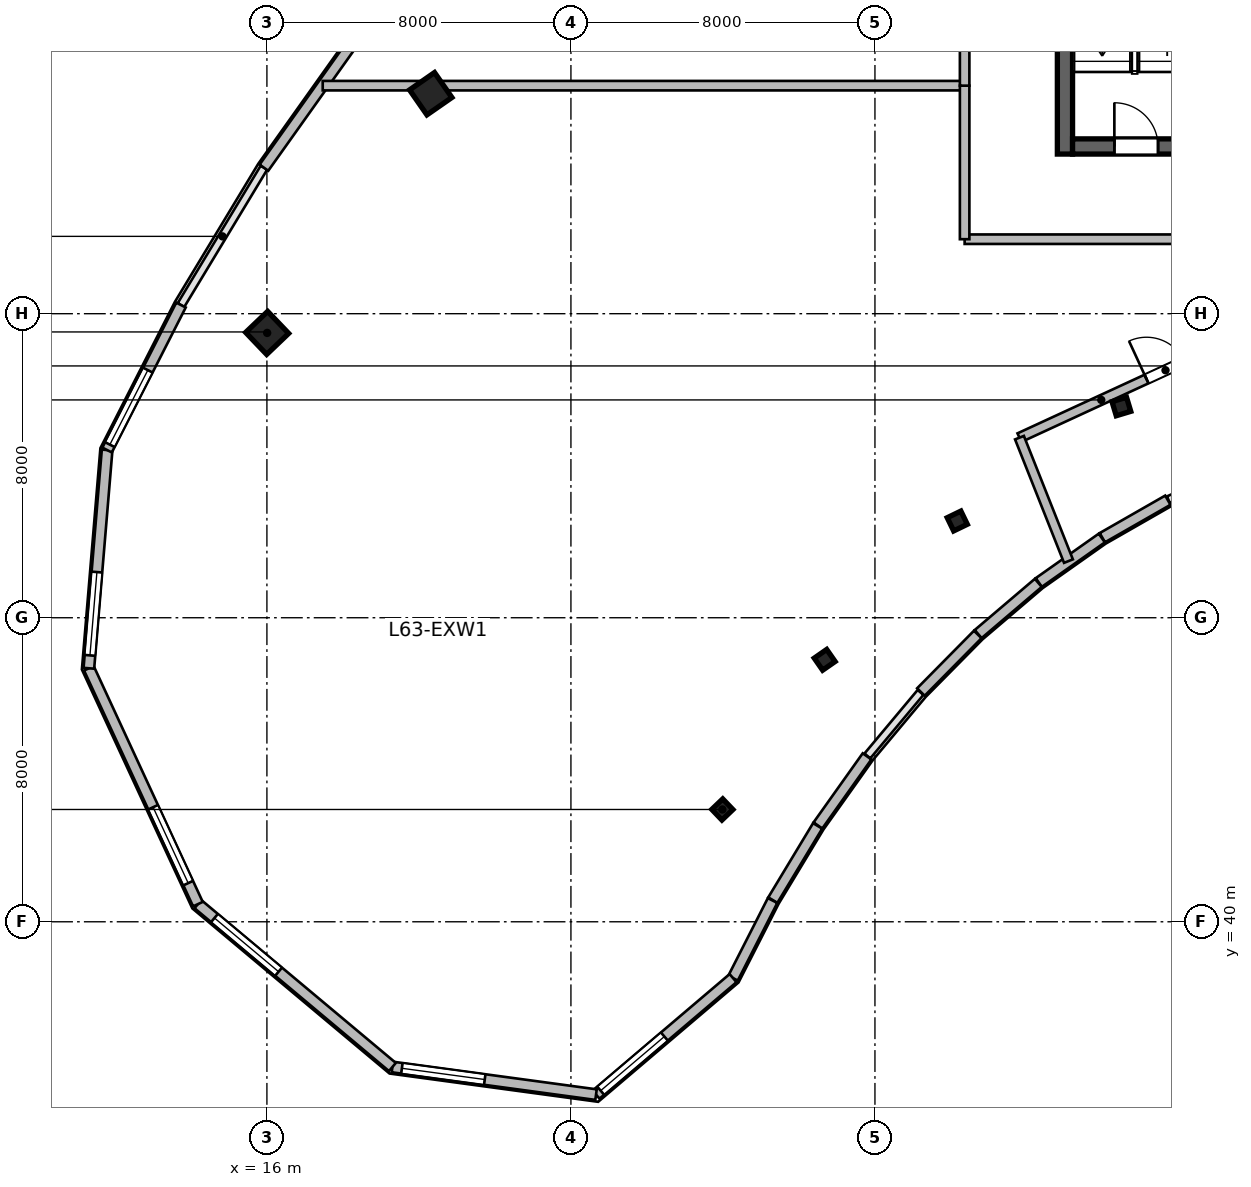
"""IFC4 building model, lengths in metres.
Left out: names, types, materials, properties, quantities, classifications, styles, units other than length and angle.
Written with IfcOpenShell. Run it as: python <this file> out.ifc"""

import sys

from ifc_helpers import new_model, si_unit, direction, frame, frame_2d, origin, origin_2d, place, context, subcontext, project, spatial, rectangle, i_section, extrude, source, transform, mapped, element, fill, save


model = new_model("IFC4")
c1 = context("Model", 3, precision=1e-05, world=origin(), true_north=direction((0.0, 1.0)))
c2 = subcontext(c1, "Body", "Model", "MODEL_VIEW")
j1 = project(units=[si_unit("LENGTHUNIT", "METRE"), si_unit("PLANEANGLEUNIT", "RADIAN")], contexts=[c1])
p1 = place(None, origin())
s1 = spatial("IfcSite", under=j1, at=p1, CompositionType="ELEMENT")
p2 = place(p1, origin())
s2 = spatial("IfcBuilding", under=s1, at=p2, CompositionType="ELEMENT")
p3 = place(p2, frame((0.0, 0.0, 260.1)))
s3 = spatial("IfcBuildingStorey", under=s2, at=p3, CompositionType="ELEMENT", Elevation=260.1)
m1 = source(origin(), c2, "Body", "SweptSolid", [
    extrude(rectangle(XDim=12.0, YDim=0.4, at=frame_2d((6.0, 0.0))), origin(), (0.0, 0.0, 1.0), 3.9),
])
p4 = place(p3, frame((37.0, 60.2, 0.0), z_axis=(0.0, 0.0, 1.0), x_axis=(0.0, 1.0, 0.0)))
e1 = element("IfcWall", 1, at=p4, inside=s3, PredefinedType="SHEAR", context=c2, shape_type="MappedRepresentation", body=[
    mapped(m1, transform((0.0, 0.0, 0.0), scale=1.0)),
])
m2 = source(origin(), c2, "Body", "SweptSolid", [
    extrude(rectangle(XDim=21.6, YDim=0.4, at=frame_2d((10.8, 0.0))), origin(), (0.0, 0.0, 1.0), 3.9),
])
p5 = place(p3, frame((37.2, 60.4, 0.0), z_axis=(0.0, 0.0, 1.0), x_axis=(1.0, 0.0, 0.0)))
e2 = element("IfcWall", 2, at=p5, inside=s3, PredefinedType="SHEAR", context=c2, shape_type="MappedRepresentation", body=[
    mapped(m2, transform((0.0, 0.0, 0.0), scale=1.0)),
])
p6 = place(p5, frame((1.1, 0.0, 0.0)))
e3 = element("IfcOpeningElement", 3, at=p6, cuts=e2, PredefinedType="OPENING", context=c2, shape_type="SweptSolid", body=[
    extrude(rectangle(XDim=1.15, YDim=2.15, at=frame_2d((0.575, 1.075))), frame((0.0, 0.21, 0.0), z_axis=(0.0, -1.0, 0.0), x_axis=(1.0, 0.0, 0.0)), (0.0, 0.0, 1.0), 0.42),
])
p7 = place(p5, frame((19.5, 0.0, 0.0)))
e4 = element("IfcOpeningElement", 4, at=p7, cuts=e2, PredefinedType="OPENING", context=c2, shape_type="SweptSolid", body=[
    extrude(rectangle(XDim=0.9, YDim=2.1, at=frame_2d((0.45, 1.05))), frame((0.0, 0.21, 0.0), z_axis=(0.0, -1.0, 0.0), x_axis=(1.0, 0.0, 0.0)), (0.0, 0.0, 1.0), 0.42),
])
p8 = place(p5, frame((12.02, 0.0, 0.0)))
e5 = element("IfcOpeningElement", 5, at=p8, cuts=e2, PredefinedType="OPENING", context=c2, shape_type="SweptSolid", body=[
    extrude(rectangle(XDim=1.6, YDim=2.15, at=frame_2d((0.8, 1.075))), frame((0.0, 0.21, 0.0), z_axis=(0.0, -1.0, 0.0), x_axis=(1.0, 0.0, 0.0)), (0.0, 0.0, 1.0), 0.42),
])
m3 = source(origin(), c2, "Body", "SweptSolid", [
    extrude(i_section(OverallWidth=0.399, OverallDepth=0.387, WebThickness=0.021, FlangeThickness=0.033, at=origin_2d()), origin(), (0.0, 0.0, 1.0), 3.9),
])
p9 = place(p3, frame((27.985, 42.955, 0.0), z_axis=(0.0, 0.0, 1.0), x_axis=(-0.690756218984, 0.723087716626, 0.0)))
e6 = element("IfcColumn", 6, at=p9, inside=s3, PredefinedType="COLUMN", context=c2, shape_type="MappedRepresentation", body=[
    mapped(m3, transform((0.0, 0.0, 0.0), scale=1.0)),
])
m4 = source(origin(), c2, "Body", "SweptSolid", [
    extrude(rectangle(XDim=0.8, YDim=0.8, at=origin_2d()), origin(), (0.0, 0.0, 1.0), 3.9),
])
p10 = place(p3, frame((16.007, 55.494, 0.0), z_axis=(0.0, 0.0, 1.0), x_axis=(-0.690756218984, 0.723087716626, 0.0)))
e7 = element("IfcColumn", 7, at=p10, inside=s3, PredefinedType="COLUMN", context=c2, shape_type="MappedRepresentation", body=[
    mapped(m4, transform((0.0, 0.0, 0.0), scale=1.0)),
])
p11 = place(p3, frame((30.677, 46.892, 0.0), z_axis=(0.0, 0.0, 1.0), x_axis=(-0.571143442153, 0.820850271661, 0.0)))
e8 = element("IfcColumn", 8, at=p11, inside=s3, PredefinedType="COLUMN", context=c2, shape_type="MappedRepresentation", body=[
    mapped(m3, transform((0.0, 0.0, 0.0), scale=1.0)),
])
p12 = place(p3, frame((20.311, 61.789, 0.0), z_axis=(0.0, 0.0, 1.0), x_axis=(-0.571143442153, 0.820850271661, 0.0)))
e9 = element("IfcColumn", 9, at=p12, inside=s3, PredefinedType="COLUMN", context=c2, shape_type="MappedRepresentation", body=[
    mapped(m4, transform((0.0, 0.0, 0.0), scale=1.0)),
])
for number, where, z_axis, x_axis in (
    (10, (34.166, 50.545, 0.0), (0.0, 0.0, 1.0), (-0.436, 0.9, 0.0)),
    (11, (38.485, 53.558, 0.0), (0.0, 0.0, 1.0), (-0.289, 0.957, 0.0)),
):
    element("IfcColumn", number, at=place(p3, frame(where, z_axis=z_axis, x_axis=x_axis)), inside=s3, PredefinedType="COLUMN", context=c2, shape_type="MappedRepresentation", body=[
        mapped(m3, transform((0.0, 0.0, 0.0), scale=1.0)),
    ])
m5 = source(origin(), c2, "Body", "SweptSolid", [
    extrude(rectangle(XDim=1.986, YDim=0.28, at=frame_2d((0.993, 0.0))), origin(), (0.0, 0.0, 1.0), 3.65),
])
p13 = place(p3, frame((39.708, 51.093, 0.0), z_axis=(0.0, 0.0, 1.0), x_axis=(-0.867940364671, -0.496668423976, 0.0)))
e12 = element("IfcWall", 12, at=p13, inside=s3, PredefinedType="SOLIDWALL", context=c2, shape_type="MappedRepresentation", body=[
    mapped(m5, transform((0.0, 0.0, 0.0), scale=1.0)),
])
m6 = source(origin(), c2, "Body", "SweptSolid", [
    extrude(rectangle(XDim=2.03, YDim=0.28, at=frame_2d((1.015, 0.0))), origin(), (0.0, 0.0, 1.0), 3.65),
])
p14 = place(p3, frame((37.969, 50.097, 0.0), z_axis=(0.0, 0.0, 1.0), x_axis=(-0.816987864272, -0.576654861796, 0.0)))
e13 = element("IfcWall", 13, at=p14, inside=s3, PredefinedType="SOLIDWALL", context=c2, shape_type="MappedRepresentation", body=[
    mapped(m6, transform((0.0, 0.0, 0.0), scale=1.0)),
])
m7 = source(origin(), c2, "Body", "SweptSolid", [
    extrude(rectangle(XDim=2.078, YDim=0.28, at=frame_2d((1.039, 0.0))), origin(), (0.0, 0.0, 1.0), 3.65),
])
p15 = place(p3, frame((36.298, 48.917, 0.0), z_axis=(0.0, 0.0, 1.0), x_axis=(-0.761475215802, -0.648194026291, 0.0)))
e14 = element("IfcWall", 14, at=p15, inside=s3, PredefinedType="SOLIDWALL", context=c2, shape_type="MappedRepresentation", body=[
    mapped(m7, transform((0.0, 0.0, 0.0), scale=1.0)),
])
m8 = source(origin(), c2, "Body", "SweptSolid", [
    extrude(rectangle(XDim=2.128, YDim=0.28, at=frame_2d((1.064, 0.0))), origin(), (0.0, 0.0, 1.0), 3.65),
])
p16 = place(p3, frame((34.705, 47.56, 0.0), z_axis=(0.0, 0.0, 1.0), x_axis=(-0.702676164983, -0.7115098082, 0.0)))
e15 = element("IfcWall", 15, at=p16, inside=s3, PredefinedType="SOLIDWALL", context=c2, shape_type="MappedRepresentation", body=[
    mapped(m8, transform((0.0, 0.0, 0.0), scale=1.0)),
])
m9 = source(origin(), c2, "Body", "SweptSolid", [
    extrude(rectangle(XDim=2.231, YDim=0.28, at=frame_2d((1.116, 0.0))), origin(), (0.0, 0.0, 1.0), 3.65),
])
p17 = place(p3, frame((31.792, 44.352, 0.0), z_axis=(0.0, 0.0, 1.0), x_axis=(-0.579622296598, -0.814885263879, 0.0)))
e16 = element("IfcWall", 16, at=p17, inside=s3, PredefinedType="SOLIDWALL", context=c2, shape_type="MappedRepresentation", body=[
    mapped(m9, transform((0.0, 0.0, 0.0), scale=1.0)),
])
m10 = source(origin(), c2, "Body", "SweptSolid", [
    extrude(rectangle(XDim=2.281, YDim=0.28, at=frame_2d((1.14, 0.0))), origin(), (0.0, 0.0, 1.0), 3.65),
])
p18 = place(p3, frame((30.492, 42.523, 0.0), z_axis=(0.0, 0.0, 1.0), x_axis=(-0.516917942662, -0.856034952881, 0.0)))
e17 = element("IfcWall", 17, at=p18, inside=s3, PredefinedType="SOLIDWALL", context=c2, shape_type="MappedRepresentation", body=[
    mapped(m10, transform((0.0, 0.0, 0.0), scale=1.0)),
])
m11 = source(origin(), c2, "Body", "SweptSolid", [
    extrude(rectangle(XDim=2.292, YDim=0.28, at=frame_2d((1.146, 0.0))), origin(), (0.0, 0.0, 1.0), 3.65),
])
p19 = place(p3, frame((29.306, 40.559, 0.0), z_axis=(0.0, 0.0, 1.0), x_axis=(-0.453933760778, -0.891035431858, 0.0)))
e18 = element("IfcWall", 18, at=p19, inside=s3, PredefinedType="SOLIDWALL", context=c2, shape_type="MappedRepresentation", body=[
    mapped(m11, transform((0.0, 0.0, 0.0), scale=1.0)),
])
m12 = source(origin(), c2, "Body", "SweptSolid", [
    extrude(rectangle(XDim=4.732, YDim=0.28, at=frame_2d((2.366, 0.0))), origin(), (0.0, 0.0, 1.0), 3.65),
])
p20 = place(p3, frame((28.266, 38.517, 0.0), z_axis=(0.0, 0.0, 1.0), x_axis=(-0.761912583238, -0.647679871158, 0.0)))
e19 = element("IfcWall", 19, at=p20, inside=s3, PredefinedType="SOLIDWALL", context=c2, shape_type="MappedRepresentation", body=[
    mapped(m12, transform((0.0, 0.0, 0.0), scale=1.0)),
])
p21 = place(p20, frame((2.372, 0.0, 0.95)))
e20 = element("IfcOpeningElement", 20, at=p21, cuts=e19, PredefinedType="OPENING", context=c2, shape_type="SweptSolid", body=[
    extrude(rectangle(XDim=2.2, YDim=2.1, at=frame_2d((1.1, 1.05))), frame((0.0, 0.15, 0.0), z_axis=(0.0, -1.0, 0.0), x_axis=(1.0, 0.0, 0.0)), (0.0, 0.0, 1.0), 0.3),
])
m13 = source(origin(), c2, "Body", "SweptSolid", [
    extrude(rectangle(XDim=5.408, YDim=0.28, at=frame_2d((2.704, 0.0))), origin(), (0.0, 0.0, 1.0), 3.65),
])
p22 = place(p3, frame((24.661, 35.452, 0.0), z_axis=(0.0, 0.0, 1.0), x_axis=(-0.990932903229, 0.134357661853, 0.0)))
e21 = element("IfcWall", 21, at=p22, inside=s3, PredefinedType="SOLIDWALL", context=c2, shape_type="MappedRepresentation", body=[
    mapped(m13, transform((0.0, 0.0, 0.0), scale=1.0)),
])
p23 = place(p22, frame((2.956, 0.0, 0.95)))
e22 = element("IfcOpeningElement", 22, at=p23, cuts=e21, PredefinedType="OPENING", context=c2, shape_type="SweptSolid", body=[
    extrude(rectangle(XDim=2.2, YDim=2.1, at=frame_2d((1.1, 1.05))), frame((0.0, 0.15, 0.0), z_axis=(0.0, -1.0, 0.0), x_axis=(1.0, 0.0, 0.0)), (0.0, 0.0, 1.0), 0.3),
])
m14 = source(origin(), c2, "Body", "SweptSolid", [
    extrude(rectangle(XDim=6.675, YDim=0.28, at=frame_2d((3.338, 0.0))), origin(), (0.0, 0.0, 1.0), 3.65),
])
p24 = place(p3, frame((19.302, 36.179, 0.0), z_axis=(0.0, 0.0, 1.0), x_axis=(-0.766726273546, 0.641974159491, 0.0)))
e23 = element("IfcWall", 23, at=p24, inside=s3, PredefinedType="SOLIDWALL", context=c2, shape_type="MappedRepresentation", body=[
    mapped(m14, transform((0.0, 0.0, 0.0), scale=1.0)),
])
p25 = place(p24, frame((3.906, 0.0, 0.95)))
e24 = element("IfcOpeningElement", 24, at=p25, cuts=e23, PredefinedType="OPENING", context=c2, shape_type="SweptSolid", body=[
    extrude(rectangle(XDim=2.2, YDim=2.1, at=frame_2d((1.1, 1.05))), frame((0.0, 0.15, 0.0), z_axis=(0.0, -1.0, 0.0), x_axis=(1.0, 0.0, 0.0)), (0.0, 0.0, 1.0), 0.3),
])
m15 = source(origin(), c2, "Body", "SweptSolid", [
    extrude(rectangle(XDim=6.837, YDim=0.28, at=frame_2d((3.418, 0.0))), origin(), (0.0, 0.0, 1.0), 3.65),
])
p26 = place(p3, frame((14.184, 40.464, 0.0), z_axis=(0.0, 0.0, 1.0), x_axis=(-0.419621957862, 0.907698965781, 0.0)))
e25 = element("IfcWall", 25, at=p26, inside=s3, PredefinedType="SOLIDWALL", context=c2, shape_type="MappedRepresentation", body=[
    mapped(m15, transform((0.0, 0.0, 0.0), scale=1.0)),
])
p27 = place(p26, frame((0.609, 0.0, 0.95)))
e26 = element("IfcOpeningElement", 26, at=p27, cuts=e25, PredefinedType="OPENING", context=c2, shape_type="SweptSolid", body=[
    extrude(rectangle(XDim=2.2, YDim=2.1, at=frame_2d((1.1, 1.05))), frame((0.0, 0.15, 0.0), z_axis=(0.0, -1.0, 0.0), x_axis=(1.0, 0.0, 0.0)), (0.0, 0.0, 1.0), 0.3),
])
m16 = source(origin(), c2, "Body", "SweptSolid", [
    extrude(rectangle(XDim=5.763, YDim=0.28, at=frame_2d((2.881, 0.0))), origin(), (0.0, 0.0, 1.0), 3.65),
])
p28 = place(p3, frame((11.315, 46.67, 0.0), z_axis=(0.0, 0.0, 1.0), x_axis=(0.083290906041, 0.996525275631, 0.0)))
e27 = element("IfcWall", 27, at=p28, inside=s3, PredefinedType="SOLIDWALL", context=c2, shape_type="MappedRepresentation", body=[
    mapped(m16, transform((0.0, 0.0, 0.0), scale=1.0)),
])
p29 = place(p28, frame((0.341, 0.0, 0.95)))
e28 = element("IfcOpeningElement", 28, at=p29, cuts=e27, PredefinedType="OPENING", context=c2, shape_type="SweptSolid", body=[
    extrude(rectangle(XDim=2.2, YDim=2.1, at=frame_2d((1.1, 1.05))), frame((0.0, 0.15, 0.0), z_axis=(0.0, -1.0, 0.0), x_axis=(1.0, 0.0, 0.0)), (0.0, 0.0, 1.0), 0.3),
])
m17 = source(origin(), c2, "Body", "SweptSolid", [
    extrude(rectangle(XDim=4.281, YDim=0.28, at=frame_2d((2.141, 0.0))), origin(), (0.0, 0.0, 1.0), 3.65),
])
p30 = place(p3, frame((11.795, 52.413, 0.0), z_axis=(0.0, 0.0, 1.0), x_axis=(0.454020597637, 0.890991187903, 0.0)))
e29 = element("IfcWall", 29, at=p30, inside=s3, PredefinedType="SOLIDWALL", context=c2, shape_type="MappedRepresentation", body=[
    mapped(m17, transform((0.0, 0.0, 0.0), scale=1.0)),
])
p31 = place(p30, frame((0.16, 0.0, 0.95)))
e30 = element("IfcOpeningElement", 30, at=p31, cuts=e29, PredefinedType="OPENING", context=c2, shape_type="SweptSolid", body=[
    extrude(rectangle(XDim=2.2, YDim=2.1, at=frame_2d((1.1, 1.05))), frame((0.0, 0.15, 0.0), z_axis=(0.0, -1.0, 0.0), x_axis=(1.0, 0.0, 0.0)), (0.0, 0.0, 1.0), 0.3),
])
m18 = source(origin(), c2, "Body", "SweptSolid", [
    extrude(rectangle(XDim=4.129, YDim=0.28, at=frame_2d((2.065, 0.0))), origin(), (0.0, 0.0, 1.0), 3.65),
])
p32 = place(p3, frame((15.921, 59.842, 0.0), z_axis=(0.0, 0.0, 1.0), x_axis=(0.57959272029, 0.814906300495, 0.0)))
e31 = element("IfcWall", 31, at=p32, inside=s3, PredefinedType="SOLIDWALL", context=c2, shape_type="MappedRepresentation", body=[
    mapped(m18, transform((0.0, 0.0, 0.0), scale=1.0)),
])
m19 = source(origin(), c2, "Body", "SweptSolid", [
    extrude(rectangle(XDim=8.464, YDim=0.25, at=frame_2d((4.232, 0.0))), origin(), (0.0, 0.0, 1.0), 3.65),
])
p33 = place(p3, frame((35.803, 52.738, 0.0), z_axis=(0.0, 0.0, 1.0), x_axis=(0.90801678306, 0.418933791524, 0.0)))
e32 = element("IfcWall", 32, at=p33, inside=s3, PredefinedType="PARTITIONING", context=c2, shape_type="MappedRepresentation", body=[
    mapped(m19, transform((0.0, 0.0, 0.0), scale=1.0)),
])
p34 = place(p33, frame((3.682, 0.0, 0.0)))
e33 = element("IfcOpeningElement", 33, at=p34, cuts=e32, PredefinedType="OPENING", context=c2, shape_type="SweptSolid", body=[
    extrude(rectangle(XDim=1.1, YDim=2.15, at=frame_2d((0.55, 1.075))), frame((0.0, 0.135, 0.0), z_axis=(0.0, -1.0, 0.0), x_axis=(1.0, 0.0, 0.0)), (0.0, 0.0, 1.0), 0.27),
])
m20 = source(origin(), c2, "Body", "SweptSolid", [
    extrude(rectangle(XDim=3.495, YDim=0.25, at=frame_2d((1.747, 0.0))), origin(), (0.0, 0.0, 1.0), 3.65),
])
p35 = place(p3, frame((37.092, 49.49, 0.0), z_axis=(0.0, 0.0, 1.0), x_axis=(-0.368859890644, 0.929485008526, 0.0)))
e34 = element("IfcWall", 34, at=p35, inside=s3, PredefinedType="PARTITIONING", context=c2, shape_type="MappedRepresentation", body=[
    mapped(m20, transform((0.0, 0.0, 0.0), scale=1.0)),
])
m21 = source(origin(), c2, "Body", "SweptSolid", [
    extrude(rectangle(XDim=12.39, YDim=0.25, at=frame_2d((6.195, 0.0))), origin(), (0.0, 0.0, 1.0), 3.65),
])
p36 = place(p3, frame((34.36, 57.96, 0.0), z_axis=(0.0, 0.0, 1.0), x_axis=(1.0, 0.0, 0.0)))
e35 = element("IfcWall", 35, at=p36, inside=s3, PredefinedType="PARTITIONING", context=c2, shape_type="MappedRepresentation", body=[
    mapped(m21, transform((0.0, 0.0, 0.0), scale=1.0)),
])
m22 = source(origin(), c2, "Body", "SweptSolid", [
    extrude(rectangle(XDim=16.892, YDim=0.25, at=frame_2d((8.446, 0.0))), origin(), (0.0, 0.0, 1.0), 3.65),
])
p37 = place(p3, frame((17.469, 62.0, 0.0), z_axis=(0.0, 0.0, 1.0), x_axis=(1.0, 0.0, 0.0)))
e36 = element("IfcWall", 36, at=p37, inside=s3, PredefinedType="PARTITIONING", context=c2, shape_type="MappedRepresentation", body=[
    mapped(m22, transform((0.0, 0.0, 0.0), scale=1.0)),
])
m23 = source(origin(), c2, "Body", "SweptSolid", [
    extrude(rectangle(XDim=4.04, YDim=0.25, at=frame_2d((2.02, 0.0))), origin(), (0.0, 0.0, 1.0), 3.65),
])
p38 = place(p3, frame((34.36, 57.96, 0.0), z_axis=(0.0, 0.0, 1.0), x_axis=(0.0, 1.0, 0.0)))
e37 = element("IfcWall", 37, at=p38, inside=s3, PredefinedType="PARTITIONING", context=c2, shape_type="MappedRepresentation", body=[
    mapped(m23, transform((0.0, 0.0, 0.0), scale=1.0)),
])
m24 = source(origin(), c2, "Body", "SweptSolid", [
    extrude(rectangle(XDim=14.245, YDim=0.25, at=frame_2d((7.123, 0.0))), origin(), (0.0, 0.0, 1.0), 3.65),
])
p39 = place(p3, frame((34.36, 62.0, 0.0), z_axis=(0.0, 0.0, 1.0), x_axis=(0.0, 1.0, 0.0)))
e38 = element("IfcWall", 38, at=p39, inside=s3, PredefinedType="PARTITIONING", context=c2, shape_type="MappedRepresentation", body=[
    mapped(m24, transform((0.0, 0.0, 0.0), scale=1.0)),
])
p40 = place(p39, frame((6.573, 0.0, 0.0)))
e39 = element("IfcOpeningElement", 39, at=p40, cuts=e38, PredefinedType="OPENING", context=c2, shape_type="SweptSolid", body=[
    extrude(rectangle(XDim=1.1, YDim=2.15, at=frame_2d((0.55, 1.075))), frame((0.0, 0.135, 0.0), z_axis=(0.0, -1.0, 0.0), x_axis=(1.0, 0.0, 0.0)), (0.0, 0.0, 1.0), 0.27),
])
m25 = source(origin(), c2, "Body", "SweptSolid", [
    extrude(rectangle(XDim=2.2, YDim=2.1, at=frame_2d((1.1, 1.05))), frame((0.0, 0.03, 0.0), z_axis=(0.0, -1.0, 0.0), x_axis=(1.0, 0.0, 0.0)), (0.0, 0.0, 1.0), 0.06),
])
p41 = place(p21, origin())
e40 = element("IfcWindow", 40, at=p41, inside=s3, PartitioningType="TRIPLE_PANEL_VERTICAL", PredefinedType="WINDOW", context=c2, shape_type="MappedRepresentation", body=[
    mapped(m25, transform((0.0, 0.0, 0.0), scale=1.0)),
])
fill(e20, e40)
p42 = place(p23, origin())
e41 = element("IfcWindow", 41, at=p42, inside=s3, PartitioningType="TRIPLE_PANEL_VERTICAL", PredefinedType="WINDOW", context=c2, shape_type="MappedRepresentation", body=[
    mapped(m25, transform((0.0, 0.0, 0.0), scale=1.0)),
])
fill(e22, e41)
p43 = place(p25, origin())
e42 = element("IfcWindow", 42, at=p43, inside=s3, PartitioningType="TRIPLE_PANEL_VERTICAL", PredefinedType="WINDOW", context=c2, shape_type="MappedRepresentation", body=[
    mapped(m25, transform((0.0, 0.0, 0.0), scale=1.0)),
])
fill(e24, e42)
p44 = place(p27, origin())
e43 = element("IfcWindow", 43, at=p44, inside=s3, PartitioningType="TRIPLE_PANEL_VERTICAL", PredefinedType="WINDOW", context=c2, shape_type="MappedRepresentation", body=[
    mapped(m25, transform((0.0, 0.0, 0.0), scale=1.0)),
])
fill(e26, e43)
p45 = place(p29, origin())
e44 = element("IfcWindow", 44, at=p45, inside=s3, PartitioningType="TRIPLE_PANEL_VERTICAL", PredefinedType="WINDOW", context=c2, shape_type="MappedRepresentation", body=[
    mapped(m25, transform((0.0, 0.0, 0.0), scale=1.0)),
])
fill(e28, e44)
p46 = place(p31, origin())
e45 = element("IfcWindow", 45, at=p46, inside=s3, PartitioningType="TRIPLE_PANEL_VERTICAL", PredefinedType="WINDOW", context=c2, shape_type="MappedRepresentation", body=[
    mapped(m25, transform((0.0, 0.0, 0.0), scale=1.0)),
])
fill(e30, e45)
m26 = source(origin(), c2, "Body", "SweptSolid", [
    extrude(rectangle(XDim=1.15, YDim=2.15, at=frame_2d((0.575, 1.075))), frame((0.0, 0.025, 0.0), z_axis=(0.0, -1.0, 0.0), x_axis=(1.0, 0.0, 0.0)), (0.0, 0.0, 1.0), 0.05),
])
p47 = place(p6, origin())
e46 = element("IfcDoor", 46, at=p47, inside=s3, OperationType="SINGLE_SWING_LEFT", PredefinedType="DOOR", context=c2, shape_type="MappedRepresentation", body=[
    mapped(m26, transform((0.0, 0.0, 0.0), scale=1.0)),
])
fill(e3, e46)
m27 = source(origin(), c2, "Body", "SweptSolid", [
    extrude(rectangle(XDim=1.1, YDim=2.15, at=frame_2d((0.55, 1.075))), frame((0.0, 0.025, 0.0), z_axis=(0.0, -1.0, 0.0), x_axis=(1.0, 0.0, 0.0)), (0.0, 0.0, 1.0), 0.05),
])
p48 = place(p34, origin())
e47 = element("IfcDoor", 47, at=p48, inside=s3, OperationType="SINGLE_SWING_LEFT", PredefinedType="DOOR", context=c2, shape_type="MappedRepresentation", body=[
    mapped(m27, transform((0.0, 0.0, 0.0), scale=1.0)),
])
fill(e33, e47)
save(model, sys.argv[1])
